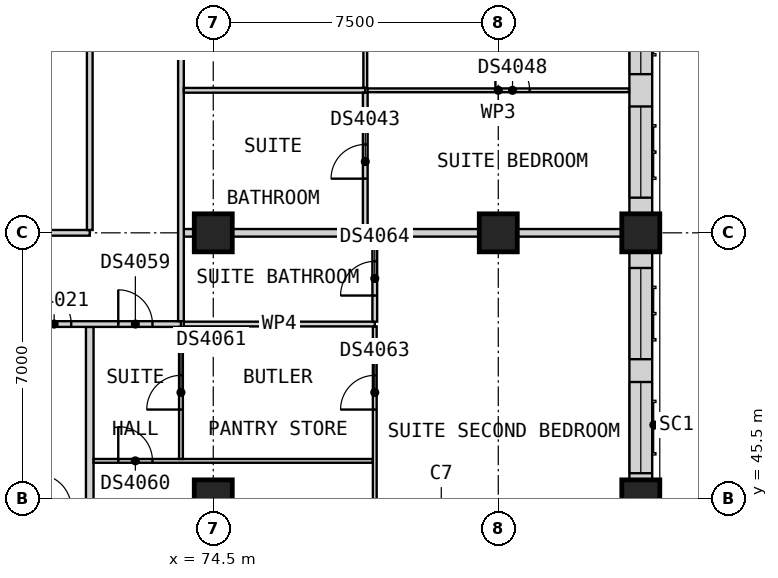
"""IFC4 building model, lengths in metres.
Left out: names, types, materials, properties, quantities, classifications, styles, units other than length and angle.
Written with IfcOpenShell. Run it as: python <this file> out.ifc"""

import sys

from ifc_helpers import new_model, si_unit, direction, frame, frame_2d, origin, origin_2d, place, context, subcontext, project, spatial, rectangle, extrude, element, fill, save


model = new_model("IFC4")
c1 = context("Model", 3, precision=1e-05, world=origin(), true_north=direction((0.0, 1.0)))
c2 = subcontext(c1, "Body", "Model", "MODEL_VIEW")
j1 = project(units=[si_unit("LENGTHUNIT", "METRE"), si_unit("PLANEANGLEUNIT", "RADIAN")], contexts=[c1])
p1 = place(None, origin())
s1 = spatial("IfcSite", under=j1, at=p1, CompositionType="ELEMENT")
p2 = place(p1, origin())
s2 = spatial("IfcBuilding", under=s1, at=p2, CompositionType="ELEMENT")
p3 = place(p2, frame((0.0, 0.0, 141.0)))
s3 = spatial("IfcBuildingStorey", under=s2, at=p3, CompositionType="ELEMENT", Elevation=141.0)
for number, where, z_axis, x_axis in (
    (1, (85.75, 45.5, 0.0), (0.0, 0.0, 1.0), (1.0, 0.0, 0.0)),
    (2, (85.75, 52.5, 0.0), (0.0, 0.0, 1.0), (1.0, 0.0, 0.0)),
    (3, (74.5, 45.5, 0.0), (0.0, 0.0, 1.0), (1.0, 0.0, 0.0)),
    (4, (74.5, 52.5, 0.0), (0.0, 0.0, 1.0), (1.0, 0.0, 0.0)),
    (5, (82.0, 52.5, 0.0), (0.0, 0.0, 1.0), (1.0, 0.0, 0.0)),
):
    element("IfcColumn", number, at=place(p3, frame(where, z_axis=z_axis, x_axis=x_axis)), inside=s3, PredefinedType="COLUMN", context=c2, shape_type="SweptSolid", body=[
        extrude(rectangle(XDim=1.0, YDim=1.0, at=origin_2d()), origin(), (0.0, 0.0, 1.0), 3.6),
    ])
p4 = place(p3, frame((85.75, 46.0, 0.0), z_axis=(0.0, 0.0, 1.0), x_axis=(0.0, 1.0, 0.0)))
e6 = element("IfcWall", 6, at=p4, inside=s3, PredefinedType="SOLIDWALL", context=c2, shape_type="SweptSolid", body=[
    extrude(rectangle(XDim=6.0, YDim=0.6, at=frame_2d((3.0, 0.0))), origin(), (0.0, 0.0, 1.0), 2.85),
])
p5 = place(p4, frame((0.175, 0.0, 0.8)))
e7 = element("IfcOpeningElement", 7, at=p5, cuts=e6, PredefinedType="OPENING", context=c2, shape_type="SweptSolid", body=[
    extrude(rectangle(XDim=2.4, YDim=1.8, at=frame_2d((1.2, 0.9))), frame((0.0, 0.31, 0.0), z_axis=(0.0, -1.0, 0.0), x_axis=(1.0, 0.0, 0.0)), (0.0, 0.0, 1.0), 0.62),
])
p6 = place(p4, frame((3.175, 0.0, 0.8)))
e8 = element("IfcOpeningElement", 8, at=p6, cuts=e6, PredefinedType="OPENING", context=c2, shape_type="SweptSolid", body=[
    extrude(rectangle(XDim=2.4, YDim=1.8, at=frame_2d((1.2, 0.9))), frame((0.0, 0.31, 0.0), z_axis=(0.0, -1.0, 0.0), x_axis=(1.0, 0.0, 0.0)), (0.0, 0.0, 1.0), 0.62),
])
p7 = place(p3, frame((85.75, 53.0, 0.0), z_axis=(0.0, 0.0, 1.0), x_axis=(0.0, 1.0, 0.0)))
e9 = element("IfcWall", 9, at=p7, inside=s3, PredefinedType="SOLIDWALL", context=c2, shape_type="SweptSolid", body=[
    extrude(rectangle(XDim=6.5, YDim=0.6, at=frame_2d((3.25, 0.0))), origin(), (0.0, 0.0, 1.0), 2.85),
])
p8 = place(p7, frame((0.425, 0.0, 0.8)))
e10 = element("IfcOpeningElement", 10, at=p8, cuts=e9, PredefinedType="OPENING", context=c2, shape_type="SweptSolid", body=[
    extrude(rectangle(XDim=2.4, YDim=1.8, at=frame_2d((1.2, 0.9))), frame((0.0, 0.31, 0.0), z_axis=(0.0, -1.0, 0.0), x_axis=(1.0, 0.0, 0.0)), (0.0, 0.0, 1.0), 0.62),
])
p9 = place(p7, frame((3.675, 0.0, 0.8)))
e11 = element("IfcOpeningElement", 11, at=p9, cuts=e9, PredefinedType="OPENING", context=c2, shape_type="SweptSolid", body=[
    extrude(rectangle(XDim=2.4, YDim=1.8, at=frame_2d((1.2, 0.9))), frame((0.0, 0.31, 0.0), z_axis=(0.0, -1.0, 0.0), x_axis=(1.0, 0.0, 0.0)), (0.0, 0.0, 1.0), 0.62),
])
p10 = place(p3, frame((73.725, 52.5, 0.0), z_axis=(0.0, 0.0, 1.0), x_axis=(1.0, 0.0, 0.0)))
e12 = element("IfcWall", 12, at=p10, inside=s3, PredefinedType="PARTITIONING", context=c2, shape_type="SweptSolid", body=[
    extrude(rectangle(XDim=12.525, YDim=0.2, at=frame_2d((6.262, 0.0))), origin(), (0.0, 0.0, 1.0), 3.35),
])
p11 = place(p3, frame((71.25, 38.31, 0.0), z_axis=(0.0, 0.0, 1.0), x_axis=(0.0, 1.0, 0.0)))
e13 = element("IfcWall", 13, at=p11, inside=s3, PredefinedType="PARTITIONING", context=c2, shape_type="SweptSolid", body=[
    extrude(rectangle(XDim=11.715, YDim=0.2, at=frame_2d((5.857, 0.0))), origin(), (0.0, 0.0, 1.0), 3.35),
])
p12 = place(p3, frame((33.75, 50.1, 0.0), z_axis=(0.0, 0.0, 1.0), x_axis=(1.0, 0.0, 0.0)))
e14 = element("IfcWall", 14, at=p12, inside=s3, PredefinedType="PARTITIONING", context=c2, shape_type="SweptSolid", body=[
    extrude(rectangle(XDim=39.9, YDim=0.15, at=frame_2d((19.95, 0.0))), origin(), (0.0, 0.0, 1.0), 3.35),
])
p13 = place(p12, frame((5.175, 0.0, 0.0)))
e15 = element("IfcOpeningElement", 15, at=p13, cuts=e14, PredefinedType="OPENING", context=c2, shape_type="SweptSolid", body=[
    extrude(rectangle(XDim=0.9, YDim=2.1, at=frame_2d((0.45, 1.05))), frame((0.0, 0.085, 0.0), z_axis=(0.0, -1.0, 0.0), x_axis=(1.0, 0.0, 0.0)), (0.0, 0.0, 1.0), 0.17),
])
p14 = place(p12, frame((9.863, 0.0, 0.0)))
e16 = element("IfcOpeningElement", 16, at=p14, cuts=e14, PredefinedType="OPENING", context=c2, shape_type="SweptSolid", body=[
    extrude(rectangle(XDim=0.9, YDim=2.1, at=frame_2d((0.45, 1.05))), frame((0.0, 0.085, 0.0), z_axis=(0.0, -1.0, 0.0), x_axis=(1.0, 0.0, 0.0)), (0.0, 0.0, 1.0), 0.17),
])
p15 = place(p12, frame((13.613, 0.0, 0.0)))
e17 = element("IfcOpeningElement", 17, at=p15, cuts=e14, PredefinedType="OPENING", context=c2, shape_type="SweptSolid", body=[
    extrude(rectangle(XDim=0.9, YDim=2.1, at=frame_2d((0.45, 1.05))), frame((0.0, 0.085, 0.0), z_axis=(0.0, -1.0, 0.0), x_axis=(1.0, 0.0, 0.0)), (0.0, 0.0, 1.0), 0.17),
])
p16 = place(p12, frame((20.688, 0.0, 0.0)))
e18 = element("IfcOpeningElement", 18, at=p16, cuts=e14, PredefinedType="OPENING", context=c2, shape_type="SweptSolid", body=[
    extrude(rectangle(XDim=1.0, YDim=2.1, at=frame_2d((0.5, 1.05))), frame((0.0, 0.085, 0.0), z_axis=(0.0, -1.0, 0.0), x_axis=(1.0, 0.0, 0.0)), (0.0, 0.0, 1.0), 0.17),
])
p17 = place(p12, frame((28.188, 0.0, 0.0)))
e19 = element("IfcOpeningElement", 19, at=p17, cuts=e14, PredefinedType="OPENING", context=c2, shape_type="SweptSolid", body=[
    extrude(rectangle(XDim=1.0, YDim=2.1, at=frame_2d((0.5, 1.05))), frame((0.0, 0.085, 0.0), z_axis=(0.0, -1.0, 0.0), x_axis=(1.0, 0.0, 0.0)), (0.0, 0.0, 1.0), 0.17),
])
p18 = place(p12, frame((32.363, 0.0, 0.0)))
e20 = element("IfcOpeningElement", 20, at=p18, cuts=e14, PredefinedType="OPENING", context=c2, shape_type="SweptSolid", body=[
    extrude(rectangle(XDim=0.9, YDim=2.1, at=frame_2d((0.45, 1.05))), frame((0.0, 0.085, 0.0), z_axis=(0.0, -1.0, 0.0), x_axis=(1.0, 0.0, 0.0)), (0.0, 0.0, 1.0), 0.17),
])
p19 = place(p12, frame((36.113, 0.0, 0.0)))
e21 = element("IfcOpeningElement", 21, at=p19, cuts=e14, PredefinedType="OPENING", context=c2, shape_type="SweptSolid", body=[
    extrude(rectangle(XDim=0.9, YDim=2.1, at=frame_2d((0.45, 1.05))), frame((0.0, 0.085, 0.0), z_axis=(0.0, -1.0, 0.0), x_axis=(1.0, 0.0, 0.0)), (0.0, 0.0, 1.0), 0.17),
])
p20 = place(p12, frame((38.25, 0.0, 0.0)))
e22 = element("IfcOpeningElement", 22, at=p20, cuts=e14, PredefinedType="OPENING", context=c2, shape_type="SweptSolid", body=[
    extrude(rectangle(XDim=0.9, YDim=2.1, at=frame_2d((0.45, 1.05))), frame((0.0, 0.085, 0.0), z_axis=(0.0, -1.0, 0.0), x_axis=(1.0, 0.0, 0.0)), (0.0, 0.0, 1.0), 0.17),
])
p21 = place(p3, frame((60.0, 52.5, 0.0), z_axis=(0.0, 0.0, 1.0), x_axis=(1.0, 0.0, 0.0)))
e23 = element("IfcWall", 23, at=p21, inside=s3, PredefinedType="PARTITIONING", context=c2, shape_type="SweptSolid", body=[
    extrude(rectangle(XDim=11.25, YDim=0.15, at=frame_2d((5.625, 0.0))), origin(), (0.0, 0.0, 1.0), 3.35),
])
p22 = place(p21, frame((5.175, 0.0, 0.0)))
e24 = element("IfcOpeningElement", 24, at=p22, cuts=e23, PredefinedType="OPENING", context=c2, shape_type="SweptSolid", body=[
    extrude(rectangle(XDim=0.9, YDim=2.1, at=frame_2d((0.45, 1.05))), frame((0.0, 0.085, 0.0), z_axis=(0.0, -1.0, 0.0), x_axis=(1.0, 0.0, 0.0)), (0.0, 0.0, 1.0), 0.17),
])
p23 = place(p3, frame((71.25, 52.575, 0.0), z_axis=(0.0, 0.0, 1.0), x_axis=(0.0, 1.0, 0.0)))
e25 = element("IfcWall", 25, at=p23, inside=s3, PredefinedType="PARTITIONING", context=c2, shape_type="SweptSolid", body=[
    extrude(rectangle(XDim=11.85, YDim=0.15, at=frame_2d((5.925, 0.0))), origin(), (0.0, 0.0, 1.0), 3.35),
])
p24 = place(p23, frame((9.225, 0.0, 0.0)))
e26 = element("IfcOpeningElement", 26, at=p24, cuts=e25, PredefinedType="OPENING", context=c2, shape_type="SweptSolid", body=[
    extrude(rectangle(XDim=0.9, YDim=2.1, at=frame_2d((0.45, 1.05))), frame((0.0, 0.085, 0.0), z_axis=(0.0, -1.0, 0.0), x_axis=(1.0, 0.0, 0.0)), (0.0, 0.0, 1.0), 0.17),
])
p25 = place(p3, frame((73.65, 50.175, 0.0), z_axis=(0.0, 0.0, 1.0), x_axis=(0.0, 1.0, 0.0)))
e27 = element("IfcWall", 27, at=p25, inside=s3, PredefinedType="PARTITIONING", context=c2, shape_type="SweptSolid", body=[
    extrude(rectangle(XDim=38.4, YDim=0.15, at=frame_2d((19.2, 0.0))), origin(), (0.0, 0.0, 1.0), 3.35),
])
p26 = place(p25, frame((7.875, 0.0, 0.0)))
e28 = element("IfcOpeningElement", 28, at=p26, cuts=e27, PredefinedType="OPENING", context=c2, shape_type="SweptSolid", body=[
    extrude(rectangle(XDim=0.9, YDim=2.1, at=frame_2d((0.45, 1.05))), frame((0.0, 0.085, 0.0), z_axis=(0.0, -1.0, 0.0), x_axis=(1.0, 0.0, 0.0)), (0.0, 0.0, 1.0), 0.17),
])
p27 = place(p25, frame((23.012, 0.0, 0.0)))
e29 = element("IfcOpeningElement", 29, at=p27, cuts=e27, PredefinedType="OPENING", context=c2, shape_type="SweptSolid", body=[
    extrude(rectangle(XDim=1.0, YDim=2.1, at=frame_2d((0.5, 1.05))), frame((0.0, 0.085, 0.0), z_axis=(0.0, -1.0, 0.0), x_axis=(1.0, 0.0, 0.0)), (0.0, 0.0, 1.0), 0.17),
])
p28 = place(p25, frame((27.188, 0.0, 0.0)))
e30 = element("IfcOpeningElement", 30, at=p28, cuts=e27, PredefinedType="OPENING", context=c2, shape_type="SweptSolid", body=[
    extrude(rectangle(XDim=0.9, YDim=2.1, at=frame_2d((0.45, 1.05))), frame((0.0, 0.085, 0.0), z_axis=(0.0, -1.0, 0.0), x_axis=(1.0, 0.0, 0.0)), (0.0, 0.0, 1.0), 0.17),
])
p29 = place(p25, frame((34.125, 0.0, 0.0)))
e31 = element("IfcOpeningElement", 31, at=p29, cuts=e27, PredefinedType="OPENING", context=c2, shape_type="SweptSolid", body=[
    extrude(rectangle(XDim=0.9, YDim=2.1, at=frame_2d((0.45, 1.05))), frame((0.0, 0.085, 0.0), z_axis=(0.0, -1.0, 0.0), x_axis=(1.0, 0.0, 0.0)), (0.0, 0.0, 1.0), 0.17),
])
p30 = place(p3, frame((71.35, 46.5, 0.0), z_axis=(0.0, 0.0, 1.0), x_axis=(1.0, 0.0, 0.0)))
e32 = element("IfcWall", 32, at=p30, inside=s3, PredefinedType="PARTITIONING", context=c2, shape_type="SweptSolid", body=[
    extrude(rectangle(XDim=7.35, YDim=0.1, at=frame_2d((3.675, 0.0))), origin(), (0.0, 0.0, 1.0), 3.35),
])
p31 = place(p30, frame((0.65, 0.0, 0.0)))
e33 = element("IfcOpeningElement", 33, at=p31, cuts=e32, PredefinedType="OPENING", context=c2, shape_type="SweptSolid", body=[
    extrude(rectangle(XDim=0.9, YDim=2.1, at=frame_2d((0.45, 1.05))), frame((0.0, 0.06, 0.0), z_axis=(0.0, -1.0, 0.0), x_axis=(1.0, 0.0, 0.0)), (0.0, 0.0, 1.0), 0.12),
])
p32 = place(p3, frame((78.562, 56.25, 0.0), z_axis=(0.0, 0.0, 1.0), x_axis=(1.0, 0.0, 0.0)))
e34 = element("IfcWall", 34, at=p32, inside=s3, PredefinedType="PARTITIONING", context=c2, shape_type="SweptSolid", body=[
    extrude(rectangle(XDim=6.877, YDim=0.1, at=frame_2d((3.439, 0.0))), origin(), (0.0, 0.0, 1.0), 3.35),
])
p33 = place(p32, frame((3.363, 0.0, 0.0)))
e35 = element("IfcOpeningElement", 35, at=p33, cuts=e34, PredefinedType="OPENING", context=c2, shape_type="SweptSolid", body=[
    extrude(rectangle(XDim=0.9, YDim=2.1, at=frame_2d((0.45, 1.05))), frame((0.0, 0.06, 0.0), z_axis=(0.0, -1.0, 0.0), x_axis=(1.0, 0.0, 0.0)), (0.0, 0.0, 1.0), 0.12),
])
p34 = place(p3, frame((73.65, 46.55, 0.0), z_axis=(0.0, 0.0, 1.0), x_axis=(0.0, 1.0, 0.0)))
e36 = element("IfcWall", 36, at=p34, inside=s3, PredefinedType="PARTITIONING", context=c2, shape_type="SweptSolid", body=[
    extrude(rectangle(XDim=3.475, YDim=0.1, at=frame_2d((1.737, 0.0))), origin(), (0.0, 0.0, 1.0), 3.35),
])
p35 = place(p34, frame((1.3, 0.0, 0.0)))
e37 = element("IfcOpeningElement", 37, at=p35, cuts=e36, PredefinedType="OPENING", context=c2, shape_type="SweptSolid", body=[
    extrude(rectangle(XDim=0.9, YDim=2.1, at=frame_2d((0.45, 1.05))), frame((0.0, 0.06, 0.0), z_axis=(0.0, -1.0, 0.0), x_axis=(1.0, 0.0, 0.0)), (0.0, 0.0, 1.0), 0.12),
])
p36 = place(p3, frame((78.5, 56.312, 0.0), z_axis=(0.0, 0.0, 1.0), x_axis=(0.0, 1.0, 0.0)))
e38 = element("IfcWall", 38, at=p36, inside=s3, PredefinedType="PARTITIONING", context=c2, shape_type="SweptSolid", body=[
    extrude(rectangle(XDim=4.375, YDim=0.1, at=frame_2d((2.188, 0.0))), origin(), (0.0, 0.0, 1.0), 3.35),
])
p37 = place(p36, frame((1.738, 0.0, 0.0)))
e39 = element("IfcOpeningElement", 39, at=p37, cuts=e38, PredefinedType="OPENING", context=c2, shape_type="SweptSolid", body=[
    extrude(rectangle(XDim=0.9, YDim=2.1, at=frame_2d((0.45, 1.05))), frame((0.0, 0.06, 0.0), z_axis=(0.0, -1.0, 0.0), x_axis=(1.0, 0.0, 0.0)), (0.0, 0.0, 1.0), 0.12),
])
p38 = place(p3, frame((78.75, 38.31, 0.0), z_axis=(0.0, 0.0, 1.0), x_axis=(0.0, 1.0, 0.0)))
e40 = element("IfcWall", 40, at=p38, inside=s3, PredefinedType="PARTITIONING", context=c2, shape_type="SweptSolid", body=[
    extrude(rectangle(XDim=11.728, YDim=0.1, at=frame_2d((5.864, 0.0))), origin(), (0.0, 0.0, 1.0), 3.35),
])
p39 = place(p38, frame((0.99, 0.0, 0.0)))
e41 = element("IfcOpeningElement", 41, at=p39, cuts=e40, PredefinedType="OPENING", context=c2, shape_type="SweptSolid", body=[
    extrude(rectangle(XDim=0.9, YDim=2.1, at=frame_2d((0.45, 1.05))), frame((0.0, 0.06, 0.0), z_axis=(0.0, -1.0, 0.0), x_axis=(1.0, 0.0, 0.0)), (0.0, 0.0, 1.0), 0.12),
])
p40 = place(p38, frame((9.54, 0.0, 0.0)))
e42 = element("IfcOpeningElement", 42, at=p40, cuts=e40, PredefinedType="OPENING", context=c2, shape_type="SweptSolid", body=[
    extrude(rectangle(XDim=0.9, YDim=2.1, at=frame_2d((0.45, 1.05))), frame((0.0, 0.06, 0.0), z_axis=(0.0, -1.0, 0.0), x_axis=(1.0, 0.0, 0.0)), (0.0, 0.0, 1.0), 0.12),
])
p41 = place(p3, frame((73.725, 50.1, 0.0), z_axis=(0.0, 0.0, 1.0), x_axis=(1.0, 0.0, 0.0)))
e43 = element("IfcWall", 43, at=p41, inside=s3, PredefinedType="PARTITIONING", context=c2, shape_type="SweptSolid", body=[
    extrude(rectangle(XDim=5.025, YDim=0.125, at=frame_2d((2.512, 0.0))), origin(), (0.0, 0.0, 1.0), 3.35),
])
p42 = place(p3, frame((73.725, 56.25, 0.0), z_axis=(0.0, 0.0, 1.0), x_axis=(1.0, 0.0, 0.0)))
e44 = element("IfcWall", 44, at=p42, inside=s3, PredefinedType="PARTITIONING", context=c2, shape_type="SweptSolid", body=[
    extrude(rectangle(XDim=4.775, YDim=0.125, at=frame_2d((2.387, 0.0))), origin(), (0.0, 0.0, 1.0), 3.35),
])
p43 = place(p3, frame((78.5, 52.6, 0.0), z_axis=(0.0, 0.0, 1.0), x_axis=(0.0, 1.0, 0.0)))
e45 = element("IfcWall", 45, at=p43, inside=s3, PredefinedType="PARTITIONING", context=c2, shape_type="SweptSolid", body=[
    extrude(rectangle(XDim=3.587, YDim=0.125, at=frame_2d((1.794, 0.0))), origin(), (0.0, 0.0, 1.0), 3.35),
])
p44 = place(p43, frame((1.325, 0.0, 0.0)))
e46 = element("IfcOpeningElement", 46, at=p44, cuts=e45, PredefinedType="OPENING", context=c2, shape_type="SweptSolid", body=[
    extrude(rectangle(XDim=0.9, YDim=2.1, at=frame_2d((0.45, 1.05))), frame((0.0, 0.073, 0.0), z_axis=(0.0, -1.0, 0.0), x_axis=(1.0, 0.0, 0.0)), (0.0, 0.0, 1.0), 0.145),
])
p45 = place(p3, frame((78.75, 50.163, 0.0), z_axis=(0.0, 0.0, 1.0), x_axis=(0.0, 1.0, 0.0)))
e47 = element("IfcWall", 47, at=p45, inside=s3, PredefinedType="PARTITIONING", context=c2, shape_type="SweptSolid", body=[
    extrude(rectangle(XDim=2.237, YDim=0.125, at=frame_2d((1.119, 0.0))), origin(), (0.0, 0.0, 1.0), 3.35),
])
p46 = place(p45, frame((0.688, 0.0, 0.0)))
e48 = element("IfcOpeningElement", 48, at=p46, cuts=e47, PredefinedType="OPENING", context=c2, shape_type="SweptSolid", body=[
    extrude(rectangle(XDim=0.9, YDim=2.1, at=frame_2d((0.45, 1.05))), frame((0.0, 0.073, 0.0), z_axis=(0.0, -1.0, 0.0), x_axis=(1.0, 0.0, 0.0)), (0.0, 0.0, 1.0), 0.145),
])
p47 = place(p5, origin())
e49 = element("IfcWindow", 49, at=p47, inside=s3, PartitioningType="SINGLE_PANEL", PredefinedType="WINDOW", context=c2, shape_type="SweptSolid", body=[
    extrude(rectangle(XDim=2.4, YDim=1.8, at=frame_2d((1.2, 0.9))), frame((0.0, -0.07, 0.0), z_axis=(0.0, -1.0, 0.0), x_axis=(1.0, 0.0, 0.0)), (0.0, 0.0, 1.0), 0.06),
])
fill(e7, e49)
p48 = place(p6, origin())
e50 = element("IfcWindow", 50, at=p48, inside=s3, PartitioningType="SINGLE_PANEL", PredefinedType="WINDOW", context=c2, shape_type="SweptSolid", body=[
    extrude(rectangle(XDim=2.4, YDim=1.8, at=frame_2d((1.2, 0.9))), frame((0.0, -0.07, 0.0), z_axis=(0.0, -1.0, 0.0), x_axis=(1.0, 0.0, 0.0)), (0.0, 0.0, 1.0), 0.06),
])
fill(e8, e50)
p49 = place(p8, origin())
e51 = element("IfcWindow", 51, at=p49, inside=s3, PartitioningType="SINGLE_PANEL", PredefinedType="WINDOW", context=c2, shape_type="SweptSolid", body=[
    extrude(rectangle(XDim=2.4, YDim=1.8, at=frame_2d((1.2, 0.9))), frame((0.0, -0.07, 0.0), z_axis=(0.0, -1.0, 0.0), x_axis=(1.0, 0.0, 0.0)), (0.0, 0.0, 1.0), 0.06),
])
fill(e10, e51)
p50 = place(p9, origin())
e52 = element("IfcWindow", 52, at=p50, inside=s3, PartitioningType="SINGLE_PANEL", PredefinedType="WINDOW", context=c2, shape_type="SweptSolid", body=[
    extrude(rectangle(XDim=2.4, YDim=1.8, at=frame_2d((1.2, 0.9))), frame((0.0, -0.07, 0.0), z_axis=(0.0, -1.0, 0.0), x_axis=(1.0, 0.0, 0.0)), (0.0, 0.0, 1.0), 0.06),
])
fill(e11, e52)
p51 = place(p19, origin())
e53 = element("IfcDoor", 53, at=p51, inside=s3, OperationType="SINGLE_SWING_RIGHT", PredefinedType="DOOR", context=c2, shape_type="SweptSolid", body=[
    extrude(rectangle(XDim=0.9, YDim=2.1, at=frame_2d((0.45, 1.05))), frame((0.0, 0.025, 0.0), z_axis=(0.0, -1.0, 0.0), x_axis=(1.0, 0.0, 0.0)), (0.0, 0.0, 1.0), 0.05),
])
fill(e21, e53)
p52 = place(p44, origin())
e54 = element("IfcDoor", 54, at=p52, inside=s3, OperationType="SINGLE_SWING_LEFT", PredefinedType="DOOR", context=c2, shape_type="SweptSolid", body=[
    extrude(rectangle(XDim=0.9, YDim=2.1, at=frame_2d((0.45, 1.05))), frame((0.0, 0.025, 0.0), z_axis=(0.0, -1.0, 0.0), x_axis=(1.0, 0.0, 0.0)), (0.0, 0.0, 1.0), 0.05),
])
fill(e46, e54)
p53 = place(p33, origin())
e55 = element("IfcDoor", 55, at=p53, inside=s3, OperationType="SINGLE_SWING_RIGHT", PredefinedType="DOOR", context=c2, shape_type="SweptSolid", body=[
    extrude(rectangle(XDim=0.9, YDim=2.1, at=frame_2d((0.45, 1.05))), frame((0.0, 0.025, 0.0), z_axis=(0.0, -1.0, 0.0), x_axis=(1.0, 0.0, 0.0)), (0.0, 0.0, 1.0), 0.05),
])
fill(e35, e55)
p54 = place(p20, origin())
e56 = element("IfcDoor", 56, at=p54, inside=s3, OperationType="SINGLE_SWING_LEFT", PredefinedType="DOOR", context=c2, shape_type="SweptSolid", body=[
    extrude(rectangle(XDim=0.9, YDim=2.1, at=frame_2d((0.45, 1.05))), frame((0.0, 0.025, 0.0), z_axis=(0.0, -1.0, 0.0), x_axis=(1.0, 0.0, 0.0)), (0.0, 0.0, 1.0), 0.05),
])
fill(e22, e56)
p55 = place(p31, origin())
e57 = element("IfcDoor", 57, at=p55, inside=s3, OperationType="SINGLE_SWING_RIGHT", PredefinedType="DOOR", context=c2, shape_type="SweptSolid", body=[
    extrude(rectangle(XDim=0.9, YDim=2.1, at=frame_2d((0.45, 1.05))), frame((0.0, 0.025, 0.0), z_axis=(0.0, -1.0, 0.0), x_axis=(1.0, 0.0, 0.0)), (0.0, 0.0, 1.0), 0.05),
])
fill(e33, e57)
p56 = place(p35, origin())
e58 = element("IfcDoor", 58, at=p56, inside=s3, OperationType="SINGLE_SWING_RIGHT", PredefinedType="DOOR", context=c2, shape_type="SweptSolid", body=[
    extrude(rectangle(XDim=0.9, YDim=2.1, at=frame_2d((0.45, 1.05))), frame((0.0, 0.025, 0.0), z_axis=(0.0, -1.0, 0.0), x_axis=(1.0, 0.0, 0.0)), (0.0, 0.0, 1.0), 0.05),
])
fill(e37, e58)
p57 = place(p40, origin())
e59 = element("IfcDoor", 59, at=p57, inside=s3, OperationType="SINGLE_SWING_RIGHT", PredefinedType="DOOR", context=c2, shape_type="SweptSolid", body=[
    extrude(rectangle(XDim=0.9, YDim=2.1, at=frame_2d((0.45, 1.05))), frame((0.0, 0.025, 0.0), z_axis=(0.0, -1.0, 0.0), x_axis=(1.0, 0.0, 0.0)), (0.0, 0.0, 1.0), 0.05),
])
fill(e42, e59)
p58 = place(p46, origin())
e60 = element("IfcDoor", 60, at=p58, inside=s3, OperationType="SINGLE_SWING_LEFT", PredefinedType="DOOR", context=c2, shape_type="SweptSolid", body=[
    extrude(rectangle(XDim=0.9, YDim=2.1, at=frame_2d((0.45, 1.05))), frame((0.0, 0.025, 0.0), z_axis=(0.0, -1.0, 0.0), x_axis=(1.0, 0.0, 0.0)), (0.0, 0.0, 1.0), 0.05),
])
fill(e48, e60)
save(model, sys.argv[1])
